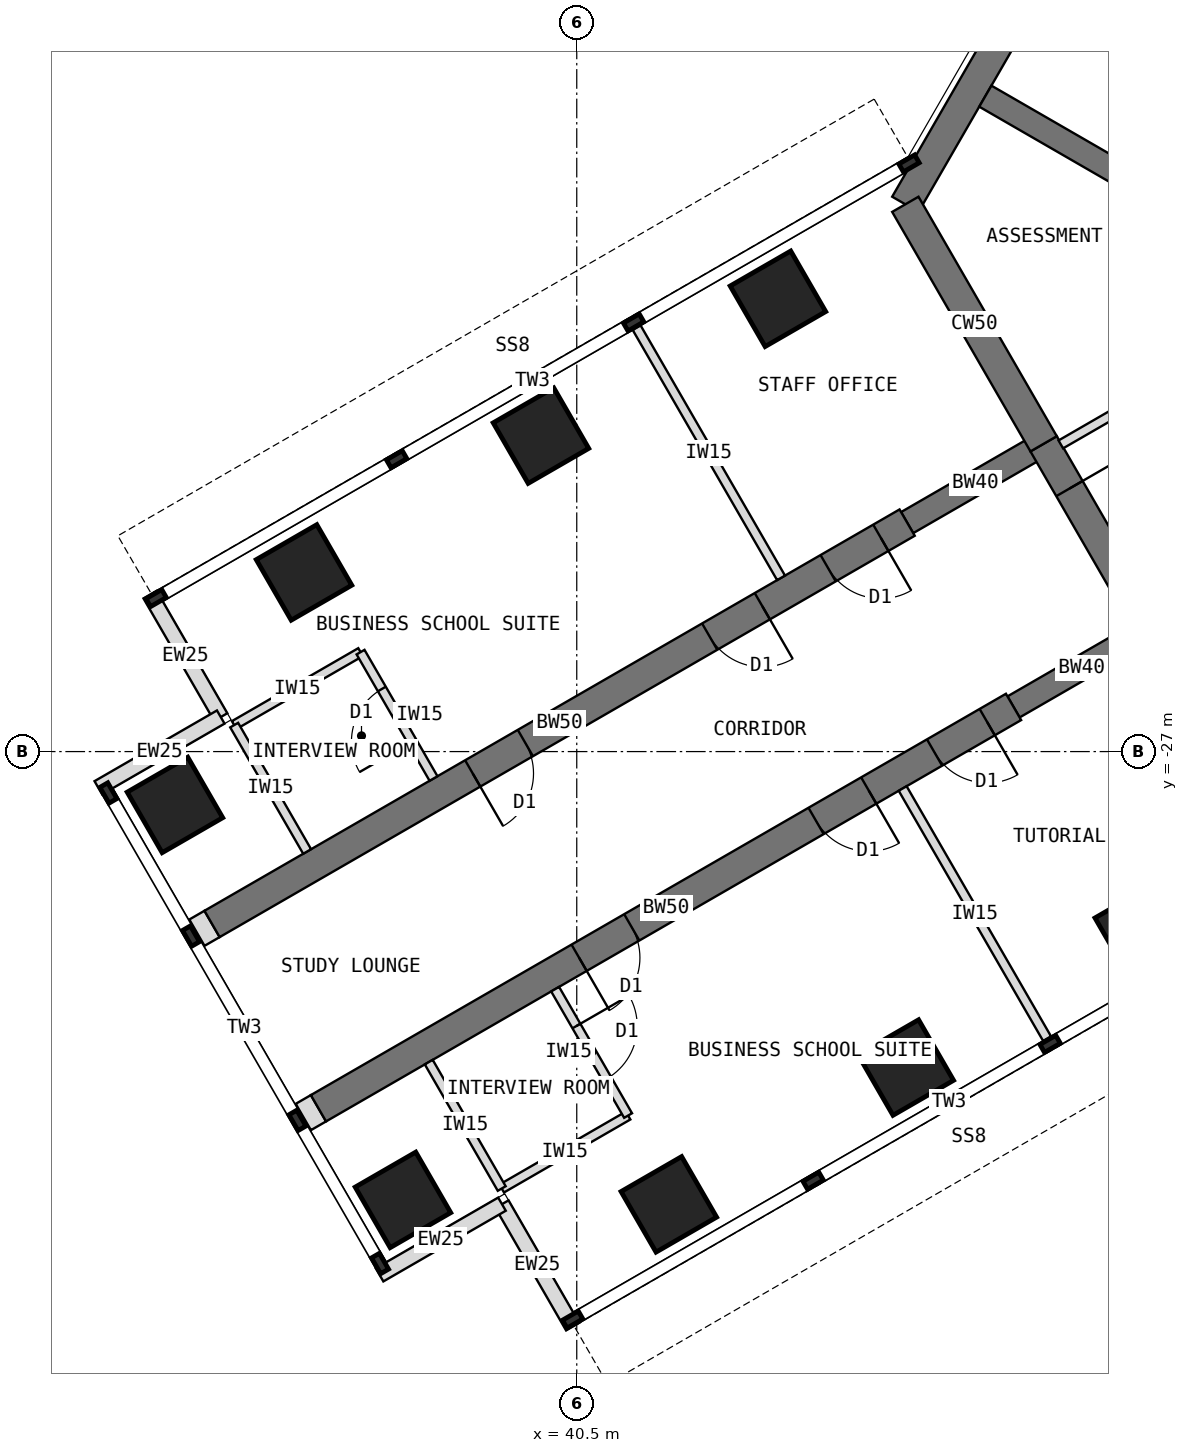
"""IFC4 building model, lengths in metres.
Left out: names, types, materials, properties, quantities, classifications, styles, units other than length and angle.
Written with IfcOpenShell. Run it as: python <this file> out.ifc"""

import sys

from ifc_helpers import new_model, si_unit, direction, frame, frame_2d, origin, origin_2d, place, context, subcontext, project, spatial, rectangle, extrude, element, fill, save


model = new_model("IFC4")
c1 = context("Model", 3, precision=1e-05, world=origin(), true_north=direction((0.0, 1.0)))
c2 = subcontext(c1, "Body", "Model", "MODEL_VIEW")
j1 = project(units=[si_unit("LENGTHUNIT", "METRE"), si_unit("PLANEANGLEUNIT", "RADIAN")], contexts=[c1])
p1 = place(None, origin())
s1 = spatial("IfcSite", under=j1, at=p1, CompositionType="ELEMENT")
p2 = place(p1, origin())
s2 = spatial("IfcBuilding", under=s1, at=p2, CompositionType="ELEMENT")
p3 = place(p2, frame((0.0, 0.0, 194.5)))
s3 = spatial("IfcBuildingStorey", under=s2, at=p3, CompositionType="ELEMENT", Elevation=194.5)
p4 = place(p3, frame((52.202, -7.092, 0.0), z_axis=(0.0, 0.0, 1.0), x_axis=(-0.500005998175, -0.866021940709, 0.0)))
e1 = element("IfcWall", 1, at=p4, inside=s3, PredefinedType="SHEAR", context=c2, shape_type="SweptSolid", body=[
    extrude(rectangle(XDim=12.596, YDim=0.5, at=frame_2d((6.298, 0.0))), origin(), (0.0, 0.0, 1.0), 4.0),
])
p5 = place(p3, frame((45.904, -18.0, 0.0), z_axis=(0.0, 0.0, 1.0), x_axis=(0.500024481964, -0.866011268655, 0.0)))
e2 = element("IfcWall", 2, at=p5, inside=s3, PredefinedType="SHEAR", context=c2, shape_type="SweptSolid", body=[
    extrude(rectangle(XDim=4.548, YDim=0.5, at=frame_2d((2.274, 0.0))), origin(), (0.0, 0.0, 1.0), 4.0),
])
p6 = place(p3, frame((48.178, -21.939, 0.0), z_axis=(0.0, 0.0, 1.0), x_axis=(0.500010275428, -0.866019471182, 0.0)))
e3 = element("IfcWall", 3, at=p6, inside=s3, PredefinedType="SHEAR", context=c2, shape_type="SweptSolid", body=[
    extrude(rectangle(XDim=3.5, YDim=0.5, at=frame_2d((1.75, 0.0))), origin(), (0.0, 0.0, 1.0), 4.0),
])
p7 = place(p6, frame((0.85, 0.0, 0.0)))
e4 = element("IfcOpeningElement", 4, at=p7, cuts=e3, PredefinedType="OPENING", context=c2, shape_type="SweptSolid", body=[
    extrude(rectangle(XDim=1.8, YDim=2.1, at=frame_2d((0.9, 1.05))), frame((0.0, 0.26, 0.0), z_axis=(0.0, -1.0, 0.0), x_axis=(1.0, 0.0, 0.0)), (0.0, 0.0, 1.0), 0.52),
])
p8 = place(p3, frame((49.928, -24.97, 0.0), z_axis=(0.0, 0.0, 1.0), x_axis=(-0.866031863473, -0.499988811324, 0.0)))
e5 = element("IfcWall", 5, at=p8, inside=s3, PredefinedType="SHEAR", context=c2, shape_type="SweptSolid", body=[
    extrude(rectangle(XDim=2.592, YDim=0.4, at=frame_2d((1.296, 0.0))), origin(), (0.0, 0.0, 1.0), 4.0),
])
p9 = place(p3, frame((47.684, -26.266, 0.0), z_axis=(0.0, 0.0, 1.0), x_axis=(-0.866027579429, -0.499996231654, 0.0)))
e6 = element("IfcWall", 6, at=p9, inside=s3, PredefinedType="SHEAR", context=c2, shape_type="SweptSolid", body=[
    extrude(rectangle(XDim=13.2, YDim=0.5, at=frame_2d((6.6, 0.0))), origin(), (0.0, 0.0, 1.0), 4.0),
])
p10 = place(p9, frame((0.5, 0.0, 0.0)))
e7 = element("IfcOpeningElement", 7, at=p10, cuts=e6, PredefinedType="OPENING", context=c2, shape_type="SweptSolid", body=[
    extrude(rectangle(XDim=1.0, YDim=2.1, at=frame_2d((0.5, 1.05))), frame((0.0, 0.26, 0.0), z_axis=(0.0, -1.0, 0.0), x_axis=(1.0, 0.0, 0.0)), (0.0, 0.0, 1.0), 0.52),
])
p11 = place(p9, frame((2.75, 0.0, 0.0)))
e8 = element("IfcOpeningElement", 8, at=p11, cuts=e6, PredefinedType="OPENING", context=c2, shape_type="SweptSolid", body=[
    extrude(rectangle(XDim=1.0, YDim=2.1, at=frame_2d((0.5, 1.05))), frame((0.0, 0.26, 0.0), z_axis=(0.0, -1.0, 0.0), x_axis=(1.0, 0.0, 0.0)), (0.0, 0.0, 1.0), 0.52),
])
p12 = place(p9, frame((7.25, 0.0, 0.0)))
e9 = element("IfcOpeningElement", 9, at=p12, cuts=e6, PredefinedType="OPENING", context=c2, shape_type="SweptSolid", body=[
    extrude(rectangle(XDim=1.0, YDim=2.1, at=frame_2d((0.5, 1.05))), frame((0.0, 0.26, 0.0), z_axis=(0.0, -1.0, 0.0), x_axis=(1.0, 0.0, 0.0)), (0.0, 0.0, 1.0), 0.52),
])
p13 = place(p3, frame((48.178, -21.939, 0.0), z_axis=(0.0, 0.0, 1.0), x_axis=(-0.866072649678, -0.499918158782, 0.0)))
e10 = element("IfcWall", 10, at=p13, inside=s3, PredefinedType="SHEAR", context=c2, shape_type="SweptSolid", body=[
    extrude(rectangle(XDim=2.592, YDim=0.4, at=frame_2d((1.296, 0.0))), origin(), (0.0, 0.0, 1.0), 4.0),
])
p14 = place(p3, frame((45.934, -23.234, 0.0), z_axis=(0.0, 0.0, 1.0), x_axis=(-0.866019570528, -0.500010103361, 0.0)))
e11 = element("IfcWall", 11, at=p14, inside=s3, PredefinedType="SHEAR", context=c2, shape_type="SweptSolid", body=[
    extrude(rectangle(XDim=13.2, YDim=0.5, at=frame_2d((6.6, 0.0))), origin(), (0.0, 0.0, 1.0), 4.0),
])
p15 = place(p14, frame((0.5, 0.0, 0.0)))
e12 = element("IfcOpeningElement", 12, at=p15, cuts=e11, PredefinedType="OPENING", context=c2, shape_type="SweptSolid", body=[
    extrude(rectangle(XDim=1.0, YDim=2.1, at=frame_2d((0.5, 1.05))), frame((0.0, 0.26, 0.0), z_axis=(0.0, -1.0, 0.0), x_axis=(1.0, 0.0, 0.0)), (0.0, 0.0, 1.0), 0.52),
])
p16 = place(p14, frame((2.75, 0.0, 0.0)))
e13 = element("IfcOpeningElement", 13, at=p16, cuts=e11, PredefinedType="OPENING", context=c2, shape_type="SweptSolid", body=[
    extrude(rectangle(XDim=1.0, YDim=2.1, at=frame_2d((0.5, 1.05))), frame((0.0, 0.26, 0.0), z_axis=(0.0, -1.0, 0.0), x_axis=(1.0, 0.0, 0.0)), (0.0, 0.0, 1.0), 0.52),
])
p17 = place(p14, frame((7.25, 0.0, 0.0)))
e14 = element("IfcOpeningElement", 14, at=p17, cuts=e11, PredefinedType="OPENING", context=c2, shape_type="SweptSolid", body=[
    extrude(rectangle(XDim=1.0, YDim=2.1, at=frame_2d((0.5, 1.05))), frame((0.0, 0.26, 0.0), z_axis=(0.0, -1.0, 0.0), x_axis=(1.0, 0.0, 0.0)), (0.0, 0.0, 1.0), 0.52),
])
for number, where, z_axis, x_axis in (
    (15, (49.809, -29.946, 0.0), (0.0, 0.0, 1.0), (0.866, 0.5, 0.0)),
    (16, (43.809, -19.554, 0.0), (0.0, 0.0, 1.0), (0.866, 0.5, 0.0)),
    (17, (45.912, -32.196, 0.0), (0.0, 0.0, 1.0), (0.866, 0.5, 0.0)),
    (18, (39.912, -21.804, 0.0), (0.0, 0.0, 1.0), (0.866, 0.5, 0.0)),
    (19, (42.014, -34.446, 0.0), (0.0, 0.0, 1.0), (0.866, 0.5, 0.0)),
    (20, (36.014, -24.054, 0.0), (0.0, 0.0, 1.0), (0.866, 0.5, 0.0)),
    (21, (37.642, -34.373, 0.0), (0.0, 0.0, 1.0), (0.866, 0.5, 0.0)),
    (22, (33.892, -27.877, 0.0), (0.0, 0.0, 1.0), (0.866, 0.5, 0.0)),
):
    element("IfcColumn", number, at=place(p3, frame(where, z_axis=z_axis, x_axis=x_axis)), inside=s3, PredefinedType="COLUMN", context=c2, shape_type="SweptSolid", body=[
        extrude(rectangle(XDim=1.15, YDim=1.15, at=origin_2d()), origin(), (0.0, 0.0, 1.0), 4.0),
    ])
for number, where, z_axis, x_axis in (
    (23, (40.433, -36.456, 0.0), (0.0, 0.0, 1.0), (-0.5, 0.866, 0.0)),
    (24, (39.27, -34.443, 0.0), (0.0, 0.0, 1.0), (-0.866, -0.5, 0.0)),
    (25, (33.483, -24.419, 0.0), (0.0, 0.0, 1.0), (0.5, -0.866, 0.0)),
    (26, (34.645, -26.432, 0.0), (0.0, 0.0, 1.0), (-0.866, -0.5, 0.0)),
):
    element("IfcWall", number, at=place(p3, frame(where, z_axis=z_axis, x_axis=x_axis)), inside=s3, PredefinedType="STANDARD", context=c2, shape_type="SweptSolid", body=[
        extrude(rectangle(XDim=2.325, YDim=0.25, at=frame_2d((1.163, 0.0))), origin(), (0.0, 0.0, 1.0), 3.8),
    ])
for number, where, z_axis, x_axis in (
    (27, (36.252, -32.865, 0.0), (0.0, 0.0, 1.0), (-0.866, -0.5, 0.0)),
    (28, (34.502, -29.834, 0.0), (0.0, 0.0, 1.0), (-0.866, -0.5, 0.0)),
):
    element("IfcWall", number, at=place(p3, frame(where, z_axis=z_axis, x_axis=x_axis)), inside=s3, PredefinedType="PARTITIONING", context=c2, shape_type="SweptSolid", body=[
        extrude(rectangle(XDim=0.288, YDim=0.5, at=frame_2d((0.144, 0.0))), origin(), (0.0, 0.0, 1.0), 3.8),
    ])
p18 = place(p3, frame((52.38, -19.201, 0.0), z_axis=(0.0, 0.0, 1.0), x_axis=(-0.866012946976, 0.500021575205, 0.0)))
e29 = element("IfcWall", 29, at=p18, inside=s3, PredefinedType="SHEAR", context=c2, shape_type="SweptSolid", body=[
    extrude(rectangle(XDim=5.958, YDim=0.4, at=frame_2d((2.979, 0.0))), origin(), (0.0, 0.0, 1.0), 4.0),
])
p19 = place(p3, frame((45.86, -27.607, 0.0), z_axis=(0.0, 0.0, 1.0), x_axis=(0.499986429846, -0.866033238375, 0.0)))
e30 = element("IfcWall", 30, at=p19, inside=s3, PredefinedType="PARTITIONING", context=c2, shape_type="SweptSolid", body=[
    extrude(rectangle(XDim=4.75, YDim=0.15, at=frame_2d((2.375, 0.0))), origin(), (0.0, 0.0, 1.0), 3.8),
])
p20 = place(p3, frame((41.344, -32.986, 0.0), z_axis=(0.0, 0.0, 1.0), x_axis=(-0.866024647952, -0.500001309137, 0.0)))
e31 = element("IfcWall", 31, at=p20, inside=s3, PredefinedType="PARTITIONING", context=c2, shape_type="SweptSolid", body=[
    extrude(rectangle(XDim=2.4, YDim=0.15, at=frame_2d((1.2, 0.0))), origin(), (0.0, 0.0, 1.0), 3.8),
])
p21 = place(p3, frame((40.144, -30.907, 0.0), z_axis=(0.0, 0.0, 1.0), x_axis=(0.499957262057, -0.866050077142, 0.0)))
e32 = element("IfcWall", 32, at=p21, inside=s3, PredefinedType="PARTITIONING", context=c2, shape_type="SweptSolid", body=[
    extrude(rectangle(XDim=2.4, YDim=0.15, at=frame_2d((1.2, 0.0))), origin(), (0.0, 0.0, 1.0), 3.8),
])
p22 = place(p21, frame((0.7, 0.0, 0.0)))
e33 = element("IfcOpeningElement", 33, at=p22, cuts=e32, PredefinedType="OPENING", context=c2, shape_type="SweptSolid", body=[
    extrude(rectangle(XDim=1.0, YDim=2.1, at=frame_2d((0.5, 1.05))), frame((0.0, 0.085, 0.0), z_axis=(0.0, -1.0, 0.0), x_axis=(1.0, 0.0, 0.0)), (0.0, 0.0, 1.0), 0.17),
])
p23 = place(p3, frame((38.066, -32.107, 0.0), z_axis=(0.0, 0.0, 1.0), x_axis=(0.499957262057, -0.866050077142, 0.0)))
e34 = element("IfcWall", 34, at=p23, inside=s3, PredefinedType="PARTITIONING", context=c2, shape_type="SweptSolid", body=[
    extrude(rectangle(XDim=2.4, YDim=0.15, at=frame_2d((1.2, 0.0))), origin(), (0.0, 0.0, 1.0), 3.8),
])
p24 = place(p3, frame((43.86, -24.143, 0.0), z_axis=(0.0, 0.0, 1.0), x_axis=(-0.499986429846, 0.866033238375, 0.0)))
e35 = element("IfcWall", 35, at=p24, inside=s3, PredefinedType="PARTITIONING", context=c2, shape_type="SweptSolid", body=[
    extrude(rectangle(XDim=4.75, YDim=0.15, at=frame_2d((2.375, 0.0))), origin(), (0.0, 0.0, 1.0), 3.8),
])
p25 = place(p3, frame((36.944, -25.365, 0.0), z_axis=(0.0, 0.0, 1.0), x_axis=(-0.866024647952, -0.500001309137, 0.0)))
e36 = element("IfcWall", 36, at=p25, inside=s3, PredefinedType="PARTITIONING", context=c2, shape_type="SweptSolid", body=[
    extrude(rectangle(XDim=2.4, YDim=0.15, at=frame_2d((1.2, 0.0))), origin(), (0.0, 0.0, 1.0), 3.8),
])
p26 = place(p3, frame((38.144, -27.443, 0.0), z_axis=(0.0, 0.0, 1.0), x_axis=(-0.500001309137, 0.866024647952, 0.0)))
e37 = element("IfcWall", 37, at=p26, inside=s3, PredefinedType="PARTITIONING", context=c2, shape_type="SweptSolid", body=[
    extrude(rectangle(XDim=2.4, YDim=0.15, at=frame_2d((1.2, 0.0))), origin(), (0.0, 0.0, 1.0), 3.8),
])
p27 = place(p26, frame((0.7, 0.0, 0.0)))
e38 = element("IfcOpeningElement", 38, at=p27, cuts=e37, PredefinedType="OPENING", context=c2, shape_type="SweptSolid", body=[
    extrude(rectangle(XDim=1.0, YDim=2.1, at=frame_2d((0.5, 1.05))), frame((0.0, 0.085, 0.0), z_axis=(0.0, -1.0, 0.0), x_axis=(1.0, 0.0, 0.0)), (0.0, 0.0, 1.0), 0.17),
])
p28 = place(p3, frame((36.066, -28.643, 0.0), z_axis=(0.0, 0.0, 1.0), x_axis=(-0.499957262057, 0.866050077142, 0.0)))
e39 = element("IfcWall", 39, at=p28, inside=s3, PredefinedType="PARTITIONING", context=c2, shape_type="SweptSolid", body=[
    extrude(rectangle(XDim=2.4, YDim=0.15, at=frame_2d((1.2, 0.0))), origin(), (0.0, 0.0, 1.0), 3.8),
])
p29 = place(p3, frame((48.461, -21.948, 0.0), z_axis=(0.0, 0.0, 1.0), x_axis=(0.866024503882, 0.500001558674, 0.0)))
e40 = element("IfcWall", 40, at=p29, inside=s3, PredefinedType="PARTITIONING", context=c2, shape_type="SweptSolid", body=[
    extrude(rectangle(XDim=4.568, YDim=0.15, at=frame_2d((2.284, 0.0))), origin(), (0.0, 0.0, 1.0), 3.8),
])
p30 = place(p29, frame((1.774, 0.0, 0.0)))
e41 = element("IfcOpeningElement", 41, at=p30, cuts=e40, PredefinedType="OPENING", context=c2, shape_type="SweptSolid", body=[
    extrude(rectangle(XDim=1.0, YDim=2.1, at=frame_2d((0.5, 1.05))), frame((0.0, 0.085, 0.0), z_axis=(0.0, -1.0, 0.0), x_axis=(1.0, 0.0, 0.0)), (0.0, 0.0, 1.0), 0.17),
])
p31 = place(p7, origin())
e42 = element("IfcDoor", 42, at=p31, inside=s3, OperationType="DOUBLE_DOOR_DOUBLE_SWING", PredefinedType="DOOR", context=c2, shape_type="SweptSolid", body=[
    extrude(rectangle(XDim=1.8, YDim=2.1, at=frame_2d((0.9, 1.05))), frame((0.0, 0.025, 0.0), z_axis=(0.0, -1.0, 0.0), x_axis=(1.0, 0.0, 0.0)), (0.0, 0.0, 1.0), 0.05),
])
fill(e4, e42)
p32 = place(p22, origin())
e43 = element("IfcDoor", 43, at=p32, inside=s3, OperationType="SINGLE_SWING_LEFT", PredefinedType="DOOR", context=c2, shape_type="SweptSolid", body=[
    extrude(rectangle(XDim=1.0, YDim=2.1, at=frame_2d((0.5, 1.05))), frame((0.0, 0.025, 0.0), z_axis=(0.0, -1.0, 0.0), x_axis=(1.0, 0.0, 0.0)), (0.0, 0.0, 1.0), 0.05),
])
fill(e33, e43)
p33 = place(p27, origin())
e44 = element("IfcDoor", 44, at=p33, inside=s3, OperationType="SINGLE_SWING_LEFT", PredefinedType="DOOR", context=c2, shape_type="SweptSolid", body=[
    extrude(rectangle(XDim=1.0, YDim=2.1, at=frame_2d((0.5, 1.05))), frame((0.0, 0.025, 0.0), z_axis=(0.0, -1.0, 0.0), x_axis=(1.0, 0.0, 0.0)), (0.0, 0.0, 1.0), 0.05),
])
fill(e38, e44)
p34 = place(p10, origin())
e45 = element("IfcDoor", 45, at=p34, inside=s3, OperationType="SINGLE_SWING_LEFT", PredefinedType="DOOR", context=c2, shape_type="SweptSolid", body=[
    extrude(rectangle(XDim=1.0, YDim=2.1, at=frame_2d((0.5, 1.05))), frame((0.0, 0.025, 0.0), z_axis=(0.0, -1.0, 0.0), x_axis=(1.0, 0.0, 0.0)), (0.0, 0.0, 1.0), 0.05),
])
fill(e7, e45)
p35 = place(p11, origin())
e46 = element("IfcDoor", 46, at=p35, inside=s3, OperationType="SINGLE_SWING_LEFT", PredefinedType="DOOR", context=c2, shape_type="SweptSolid", body=[
    extrude(rectangle(XDim=1.0, YDim=2.1, at=frame_2d((0.5, 1.05))), frame((0.0, 0.025, 0.0), z_axis=(0.0, -1.0, 0.0), x_axis=(1.0, 0.0, 0.0)), (0.0, 0.0, 1.0), 0.05),
])
fill(e8, e46)
p36 = place(p12, origin())
e47 = element("IfcDoor", 47, at=p36, inside=s3, OperationType="SINGLE_SWING_RIGHT", PredefinedType="DOOR", context=c2, shape_type="SweptSolid", body=[
    extrude(rectangle(XDim=1.0, YDim=2.1, at=frame_2d((0.5, 1.05))), frame((0.0, 0.025, 0.0), z_axis=(0.0, -1.0, 0.0), x_axis=(1.0, 0.0, 0.0)), (0.0, 0.0, 1.0), 0.05),
])
fill(e9, e47)
p37 = place(p15, origin())
e48 = element("IfcDoor", 48, at=p37, inside=s3, OperationType="SINGLE_SWING_LEFT", PredefinedType="DOOR", context=c2, shape_type="SweptSolid", body=[
    extrude(rectangle(XDim=1.0, YDim=2.1, at=frame_2d((0.5, 1.05))), frame((0.0, 0.025, 0.0), z_axis=(0.0, -1.0, 0.0), x_axis=(1.0, 0.0, 0.0)), (0.0, 0.0, 1.0), 0.05),
])
fill(e12, e48)
p38 = place(p16, origin())
e49 = element("IfcDoor", 49, at=p38, inside=s3, OperationType="SINGLE_SWING_LEFT", PredefinedType="DOOR", context=c2, shape_type="SweptSolid", body=[
    extrude(rectangle(XDim=1.0, YDim=2.1, at=frame_2d((0.5, 1.05))), frame((0.0, 0.025, 0.0), z_axis=(0.0, -1.0, 0.0), x_axis=(1.0, 0.0, 0.0)), (0.0, 0.0, 1.0), 0.05),
])
fill(e13, e49)
p39 = place(p17, origin())
e50 = element("IfcDoor", 50, at=p39, inside=s3, OperationType="SINGLE_SWING_RIGHT", PredefinedType="DOOR", context=c2, shape_type="SweptSolid", body=[
    extrude(rectangle(XDim=1.0, YDim=2.1, at=frame_2d((0.5, 1.05))), frame((0.0, 0.025, 0.0), z_axis=(0.0, -1.0, 0.0), x_axis=(1.0, 0.0, 0.0)), (0.0, 0.0, 1.0), 0.05),
])
fill(e14, e50)
save(model, sys.argv[1])
